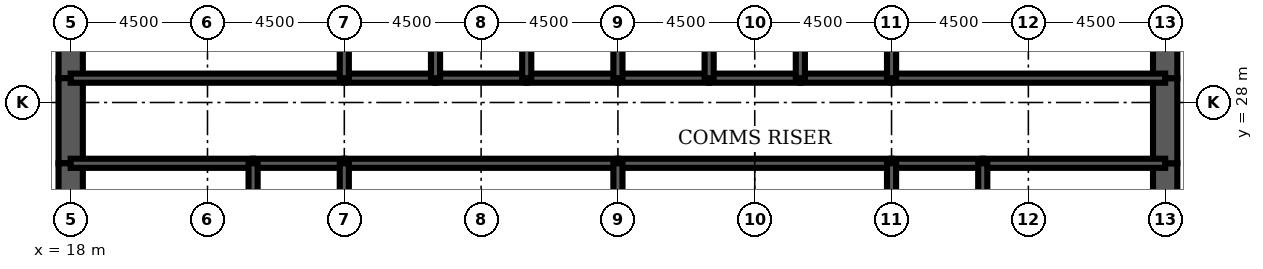
"""IFC4 building model, lengths in metres.
Left out: names, types, materials, properties, quantities, classifications, styles, units other than length and angle.
Written with IfcOpenShell. Run it as: python <this file> out.ifc"""

import sys

from ifc_helpers import new_model, si_unit, direction, frame, frame_2d, origin, place, context, subcontext, project, spatial, rectangle, extrude, element, fill, save


model = new_model("IFC4")
c1 = context("Model", 3, precision=1e-05, world=origin(), true_north=direction((0.0, 1.0)))
c2 = subcontext(c1, "Body", "Model", "MODEL_VIEW")
j1 = project(units=[si_unit("LENGTHUNIT", "METRE"), si_unit("PLANEANGLEUNIT", "RADIAN")], contexts=[c1])
p1 = place(None, origin())
s1 = spatial("IfcSite", under=j1, at=p1, CompositionType="ELEMENT")
p2 = place(p1, origin())
s2 = spatial("IfcBuilding", under=s1, at=p2, CompositionType="ELEMENT")
p3 = place(p2, frame((0.0, 0.0, 190.0)))
s3 = spatial("IfcBuildingStorey", under=s2, at=p3, CompositionType="ELEMENT", Elevation=190.0)
p4 = place(p3, frame((18.0, 32.0, 0.0), z_axis=(0.0, 0.0, 1.0), x_axis=(0.0, -1.0, 0.0)))
e1 = element("IfcWall", 1, at=p4, inside=s3, PredefinedType="SHEAR", context=c2, shape_type="SweptSolid", body=[
    extrude(rectangle(XDim=3.2, YDim=0.8, at=frame_2d((1.6, 0.0))), origin(), (0.0, 0.0, 1.0), 4.2),
])
p5 = place(p3, frame((18.0, 28.8, 0.0), z_axis=(0.0, 0.0, 1.0), x_axis=(0.0, -1.0, 0.0)))
e2 = element("IfcWall", 2, at=p5, inside=s3, PredefinedType="SHEAR", context=c2, shape_type="SweptSolid", body=[
    extrude(rectangle(XDim=2.8, YDim=0.8, at=frame_2d((1.4, 0.0))), origin(), (0.0, 0.0, 1.0), 4.2),
])
p6 = place(p5, frame((0.4, 0.0, 0.0)))
e3 = element("IfcOpeningElement", 3, at=p6, cuts=e2, PredefinedType="OPENING", context=c2, shape_type="SweptSolid", body=[
    extrude(rectangle(XDim=1.8, YDim=2.1, at=frame_2d((0.9, 1.05))), frame((0.0, 0.41, 0.0), z_axis=(0.0, -1.0, 0.0), x_axis=(1.0, 0.0, 0.0)), (0.0, 0.0, 1.0), 0.82),
])
for number, where, z_axis, x_axis in (
    (4, (18.0, 26.0, 0.0), (0.0, 0.0, 1.0), (0.0, -1.0, 0.0)),
    (5, (54.0, 22.0, 0.0), (0.0, 0.0, 1.0), (0.0, 1.0, 0.0)),
):
    element("IfcWall", number, at=place(p3, frame(where, z_axis=z_axis, x_axis=x_axis)), inside=s3, PredefinedType="SHEAR", context=c2, shape_type="SweptSolid", body=[
        extrude(rectangle(XDim=4.0, YDim=0.8, at=frame_2d((2.0, 0.0))), origin(), (0.0, 0.0, 1.0), 4.2),
    ])
p7 = place(p3, frame((54.0, 26.0, 0.0), z_axis=(0.0, 0.0, 1.0), x_axis=(0.0, 1.0, 0.0)))
e6 = element("IfcWall", 6, at=p7, inside=s3, PredefinedType="SHEAR", context=c2, shape_type="SweptSolid", body=[
    extrude(rectangle(XDim=2.8, YDim=0.8, at=frame_2d((1.4, 0.0))), origin(), (0.0, 0.0, 1.0), 4.2),
])
p8 = place(p7, frame((0.6, 0.0, 0.0)))
e7 = element("IfcOpeningElement", 7, at=p8, cuts=e6, PredefinedType="OPENING", context=c2, shape_type="SweptSolid", body=[
    extrude(rectangle(XDim=1.8, YDim=2.1, at=frame_2d((0.9, 1.05))), frame((0.0, 0.41, 0.0), z_axis=(0.0, -1.0, 0.0), x_axis=(1.0, 0.0, 0.0)), (0.0, 0.0, 1.0), 0.82),
])
p9 = place(p3, frame((54.0, 28.8, 0.0), z_axis=(0.0, 0.0, 1.0), x_axis=(0.0, 1.0, 0.0)))
e8 = element("IfcWall", 8, at=p9, inside=s3, PredefinedType="SHEAR", context=c2, shape_type="SweptSolid", body=[
    extrude(rectangle(XDim=3.2, YDim=0.8, at=frame_2d((1.6, 0.0))), origin(), (0.0, 0.0, 1.0), 4.2),
])
p10 = place(p3, frame((18.0, 28.8, 0.0), z_axis=(0.0, 0.0, 1.0), x_axis=(1.0, 0.0, 0.0)))
e9 = element("IfcWall", 9, at=p10, inside=s3, PredefinedType="SOLIDWALL", context=c2, shape_type="SweptSolid", body=[
    extrude(rectangle(XDim=9.0, YDim=0.3, at=frame_2d((4.5, 0.0))), origin(), (0.0, 0.0, 1.0), 4.2),
])
p11 = place(p10, frame((0.65, 0.0, 0.0)))
e10 = element("IfcOpeningElement", 10, at=p11, cuts=e9, PredefinedType="OPENING", context=c2, shape_type="SweptSolid", body=[
    extrude(rectangle(XDim=1.0, YDim=2.1, at=frame_2d((0.5, 1.05))), frame((0.0, 0.16, 0.0), z_axis=(0.0, -1.0, 0.0), x_axis=(1.0, 0.0, 0.0)), (0.0, 0.0, 1.0), 0.32),
])
p12 = place(p3, frame((27.0, 28.8, 0.0), z_axis=(0.0, 0.0, 1.0), x_axis=(1.0, 0.0, 0.0)))
e11 = element("IfcWall", 11, at=p12, inside=s3, PredefinedType="SOLIDWALL", context=c2, shape_type="SweptSolid", body=[
    extrude(rectangle(XDim=3.0, YDim=0.3, at=frame_2d((1.5, 0.0))), origin(), (0.0, 0.0, 1.0), 4.2),
])
p13 = place(p12, frame((0.95, 0.0, 0.0)))
e12 = element("IfcOpeningElement", 12, at=p13, cuts=e11, PredefinedType="OPENING", context=c2, shape_type="SweptSolid", body=[
    extrude(rectangle(XDim=1.1, YDim=2.2, at=frame_2d((0.55, 1.1))), frame((0.0, 0.16, 0.0), z_axis=(0.0, -1.0, 0.0), x_axis=(1.0, 0.0, 0.0)), (0.0, 0.0, 1.0), 0.32),
])
p14 = place(p3, frame((30.0, 28.8, 0.0), z_axis=(0.0, 0.0, 1.0), x_axis=(1.0, 0.0, 0.0)))
e13 = element("IfcWall", 13, at=p14, inside=s3, PredefinedType="SOLIDWALL", context=c2, shape_type="SweptSolid", body=[
    extrude(rectangle(XDim=3.0, YDim=0.3, at=frame_2d((1.5, 0.0))), origin(), (0.0, 0.0, 1.0), 4.2),
])
p15 = place(p14, frame((0.95, 0.0, 0.0)))
e14 = element("IfcOpeningElement", 14, at=p15, cuts=e13, PredefinedType="OPENING", context=c2, shape_type="SweptSolid", body=[
    extrude(rectangle(XDim=1.1, YDim=2.2, at=frame_2d((0.55, 1.1))), frame((0.0, 0.16, 0.0), z_axis=(0.0, -1.0, 0.0), x_axis=(1.0, 0.0, 0.0)), (0.0, 0.0, 1.0), 0.32),
])
p16 = place(p3, frame((33.0, 28.8, 0.0), z_axis=(0.0, 0.0, 1.0), x_axis=(1.0, 0.0, 0.0)))
e15 = element("IfcWall", 15, at=p16, inside=s3, PredefinedType="SOLIDWALL", context=c2, shape_type="SweptSolid", body=[
    extrude(rectangle(XDim=3.0, YDim=0.3, at=frame_2d((1.5, 0.0))), origin(), (0.0, 0.0, 1.0), 4.2),
])
p17 = place(p16, frame((0.95, 0.0, 0.0)))
e16 = element("IfcOpeningElement", 16, at=p17, cuts=e15, PredefinedType="OPENING", context=c2, shape_type="SweptSolid", body=[
    extrude(rectangle(XDim=1.1, YDim=2.2, at=frame_2d((0.55, 1.1))), frame((0.0, 0.16, 0.0), z_axis=(0.0, -1.0, 0.0), x_axis=(1.0, 0.0, 0.0)), (0.0, 0.0, 1.0), 0.32),
])
for number, where, z_axis, x_axis in (
    (17, (36.0, 28.8, 0.0), (0.0, 0.0, 1.0), (1.0, 0.0, 0.0)),
    (18, (39.0, 28.8, 0.0), (0.0, 0.0, 1.0), (1.0, 0.0, 0.0)),
):
    element("IfcWall", number, at=place(p3, frame(where, z_axis=z_axis, x_axis=x_axis)), inside=s3, PredefinedType="SOLIDWALL", context=c2, shape_type="SweptSolid", body=[
        extrude(rectangle(XDim=3.0, YDim=0.3, at=frame_2d((1.5, 0.0))), origin(), (0.0, 0.0, 1.0), 4.2),
    ])
p18 = place(p3, frame((42.0, 28.8, 0.0), z_axis=(0.0, 0.0, 1.0), x_axis=(1.0, 0.0, 0.0)))
e19 = element("IfcWall", 19, at=p18, inside=s3, PredefinedType="SOLIDWALL", context=c2, shape_type="SweptSolid", body=[
    extrude(rectangle(XDim=3.0, YDim=0.3, at=frame_2d((1.5, 0.0))), origin(), (0.0, 0.0, 1.0), 4.2),
])
p19 = place(p18, frame((0.95, 0.0, 0.0)))
e20 = element("IfcOpeningElement", 20, at=p19, cuts=e19, PredefinedType="OPENING", context=c2, shape_type="SweptSolid", body=[
    extrude(rectangle(XDim=1.1, YDim=2.2, at=frame_2d((0.55, 1.1))), frame((0.0, 0.16, 0.0), z_axis=(0.0, -1.0, 0.0), x_axis=(1.0, 0.0, 0.0)), (0.0, 0.0, 1.0), 0.32),
])
p20 = place(p3, frame((45.0, 28.8, 0.0), z_axis=(0.0, 0.0, 1.0), x_axis=(1.0, 0.0, 0.0)))
e21 = element("IfcWall", 21, at=p20, inside=s3, PredefinedType="SOLIDWALL", context=c2, shape_type="SweptSolid", body=[
    extrude(rectangle(XDim=9.0, YDim=0.3, at=frame_2d((4.5, 0.0))), origin(), (0.0, 0.0, 1.0), 4.2),
])
p21 = place(p20, frame((7.35, 0.0, 0.0)))
e22 = element("IfcOpeningElement", 22, at=p21, cuts=e21, PredefinedType="OPENING", context=c2, shape_type="SweptSolid", body=[
    extrude(rectangle(XDim=1.0, YDim=2.1, at=frame_2d((0.5, 1.05))), frame((0.0, 0.16, 0.0), z_axis=(0.0, -1.0, 0.0), x_axis=(1.0, 0.0, 0.0)), (0.0, 0.0, 1.0), 0.32),
])
p22 = place(p3, frame((18.0, 26.0, 0.0), z_axis=(0.0, 0.0, 1.0), x_axis=(1.0, 0.0, 0.0)))
e23 = element("IfcWall", 23, at=p22, inside=s3, PredefinedType="SOLIDWALL", context=c2, shape_type="SweptSolid", body=[
    extrude(rectangle(XDim=6.0, YDim=0.3, at=frame_2d((3.0, 0.0))), origin(), (0.0, 0.0, 1.0), 4.2),
])
p23 = place(p3, frame((24.0, 26.0, 0.0), z_axis=(0.0, 0.0, 1.0), x_axis=(1.0, 0.0, 0.0)))
e24 = element("IfcWall", 24, at=p23, inside=s3, PredefinedType="SOLIDWALL", context=c2, shape_type="SweptSolid", body=[
    extrude(rectangle(XDim=3.0, YDim=0.3, at=frame_2d((1.5, 0.0))), origin(), (0.0, 0.0, 1.0), 4.2),
])
for number, where, z_axis, x_axis in (
    (25, (27.0, 26.0, 0.0), (0.0, 0.0, 1.0), (1.0, 0.0, 0.0)),
    (26, (36.0, 26.0, 0.0), (0.0, 0.0, 1.0), (1.0, 0.0, 0.0)),
):
    element("IfcWall", number, at=place(p3, frame(where, z_axis=z_axis, x_axis=x_axis)), inside=s3, PredefinedType="SOLIDWALL", context=c2, shape_type="SweptSolid", body=[
        extrude(rectangle(XDim=9.0, YDim=0.3, at=frame_2d((4.5, 0.0))), origin(), (0.0, 0.0, 1.0), 4.2),
    ])
p24 = place(p3, frame((45.0, 26.0, 0.0), z_axis=(0.0, 0.0, 1.0), x_axis=(1.0, 0.0, 0.0)))
e27 = element("IfcWall", 27, at=p24, inside=s3, PredefinedType="SOLIDWALL", context=c2, shape_type="SweptSolid", body=[
    extrude(rectangle(XDim=3.0, YDim=0.3, at=frame_2d((1.5, 0.0))), origin(), (0.0, 0.0, 1.0), 4.2),
])
p25 = place(p3, frame((48.0, 26.0, 0.0), z_axis=(0.0, 0.0, 1.0), x_axis=(1.0, 0.0, 0.0)))
e28 = element("IfcWall", 28, at=p25, inside=s3, PredefinedType="SOLIDWALL", context=c2, shape_type="SweptSolid", body=[
    extrude(rectangle(XDim=6.0, YDim=0.3, at=frame_2d((3.0, 0.0))), origin(), (0.0, 0.0, 1.0), 4.2),
])
for number, where, z_axis, x_axis in (
    (29, (27.0, 28.8, 0.0), (0.0, 0.0, 1.0), (0.0, 1.0, 0.0)),
    (30, (30.0, 28.8, 0.0), (0.0, 0.0, 1.0), (0.0, 1.0, 0.0)),
    (31, (33.0, 28.8, 0.0), (0.0, 0.0, 1.0), (0.0, 1.0, 0.0)),
    (32, (36.0, 28.8, 0.0), (0.0, 0.0, 1.0), (0.0, 1.0, 0.0)),
    (33, (39.0, 28.8, 0.0), (0.0, 0.0, 1.0), (0.0, 1.0, 0.0)),
    (34, (42.0, 28.8, 0.0), (0.0, 0.0, 1.0), (0.0, 1.0, 0.0)),
    (35, (45.0, 28.8, 0.0), (0.0, 0.0, 1.0), (0.0, 1.0, 0.0)),
):
    element("IfcWall", number, at=place(p3, frame(where, z_axis=z_axis, x_axis=x_axis)), inside=s3, PredefinedType="SOLIDWALL", context=c2, shape_type="SweptSolid", body=[
        extrude(rectangle(XDim=3.2, YDim=0.3, at=frame_2d((1.6, 0.0))), origin(), (0.0, 0.0, 1.0), 4.2),
    ])
for number, where, z_axis, x_axis in (
    (36, (24.0, 22.0, 0.0), (0.0, 0.0, 1.0), (0.0, 1.0, 0.0)),
    (37, (27.0, 22.0, 0.0), (0.0, 0.0, 1.0), (0.0, 1.0, 0.0)),
    (38, (36.0, 22.0, 0.0), (0.0, 0.0, 1.0), (0.0, 1.0, 0.0)),
    (39, (45.0, 22.0, 0.0), (0.0, 0.0, 1.0), (0.0, 1.0, 0.0)),
    (40, (48.0, 22.0, 0.0), (0.0, 0.0, 1.0), (0.0, 1.0, 0.0)),
):
    element("IfcWall", number, at=place(p3, frame(where, z_axis=z_axis, x_axis=x_axis)), inside=s3, PredefinedType="SOLIDWALL", context=c2, shape_type="SweptSolid", body=[
        extrude(rectangle(XDim=4.0, YDim=0.3, at=frame_2d((2.0, 0.0))), origin(), (0.0, 0.0, 1.0), 4.2),
    ])
p26 = place(p3, frame((39.0, 22.15, 0.0), z_axis=(0.0, 0.0, 1.0), x_axis=(0.0, 1.0, 0.0)))
e41 = element("IfcWall", 41, at=p26, inside=s3, PredefinedType="PARTITIONING", context=c2, shape_type="SweptSolid", body=[
    extrude(rectangle(XDim=3.7, YDim=0.15, at=frame_2d((1.85, 0.0))), origin(), (0.0, 0.0, 1.0), 3.0),
])
p27 = place(p26, frame((2.2, 0.0, 0.0)))
e42 = element("IfcOpeningElement", 42, at=p27, cuts=e41, PredefinedType="OPENING", context=c2, shape_type="SweptSolid", body=[
    extrude(rectangle(XDim=1.0, YDim=2.1, at=frame_2d((0.5, 1.05))), frame((0.0, 0.085, 0.0), z_axis=(0.0, -1.0, 0.0), x_axis=(1.0, 0.0, 0.0)), (0.0, 0.0, 1.0), 0.17),
])
for number, where, z_axis, x_axis in (
    (43, (20.275, 22.15, 0.0), (0.0, 0.0, 1.0), (0.0, 1.0, 0.0)),
    (44, (51.725, 22.15, 0.0), (0.0, 0.0, 1.0), (0.0, 1.0, 0.0)),
):
    element("IfcWall", number, at=place(p3, frame(where, z_axis=z_axis, x_axis=x_axis)), inside=s3, PredefinedType="PARTITIONING", context=c2, shape_type="SweptSolid", body=[
        extrude(rectangle(XDim=3.7, YDim=0.15, at=frame_2d((1.85, 0.0))), origin(), (0.0, 0.0, 1.0), 3.0),
    ])
p28 = place(p27, origin())
e45 = element("IfcDoor", 45, at=p28, inside=s3, OperationType="SINGLE_SWING_RIGHT", PredefinedType="DOOR", context=c2, shape_type="SweptSolid", body=[
    extrude(rectangle(XDim=1.0, YDim=2.1, at=frame_2d((0.5, 1.05))), frame((0.0, 0.025, 0.0), z_axis=(0.0, -1.0, 0.0), x_axis=(1.0, 0.0, 0.0)), (0.0, 0.0, 1.0), 0.05),
])
fill(e42, e45)
p29 = place(p19, origin())
e46 = element("IfcDoor", 46, at=p29, inside=s3, OperationType="DOUBLE_DOOR_SLIDING", PredefinedType="USERDEFINED", context=c2, shape_type="SweptSolid", body=[
    extrude(rectangle(XDim=1.1, YDim=2.2, at=frame_2d((0.55, 1.1))), frame((0.0, 0.025, 0.0), z_axis=(0.0, -1.0, 0.0), x_axis=(1.0, 0.0, 0.0)), (0.0, 0.0, 1.0), 0.05),
])
fill(e20, e46)
p30 = place(p13, origin())
e47 = element("IfcDoor", 47, at=p30, inside=s3, OperationType="DOUBLE_DOOR_SLIDING", PredefinedType="USERDEFINED", context=c2, shape_type="SweptSolid", body=[
    extrude(rectangle(XDim=1.1, YDim=2.2, at=frame_2d((0.55, 1.1))), frame((0.0, 0.025, 0.0), z_axis=(0.0, -1.0, 0.0), x_axis=(1.0, 0.0, 0.0)), (0.0, 0.0, 1.0), 0.05),
])
fill(e12, e47)
p31 = place(p15, origin())
e48 = element("IfcDoor", 48, at=p31, inside=s3, OperationType="DOUBLE_DOOR_SLIDING", PredefinedType="USERDEFINED", context=c2, shape_type="SweptSolid", body=[
    extrude(rectangle(XDim=1.1, YDim=2.2, at=frame_2d((0.55, 1.1))), frame((0.0, 0.025, 0.0), z_axis=(0.0, -1.0, 0.0), x_axis=(1.0, 0.0, 0.0)), (0.0, 0.0, 1.0), 0.05),
])
fill(e14, e48)
p32 = place(p17, origin())
e49 = element("IfcDoor", 49, at=p32, inside=s3, OperationType="DOUBLE_DOOR_SLIDING", PredefinedType="USERDEFINED", context=c2, shape_type="SweptSolid", body=[
    extrude(rectangle(XDim=1.1, YDim=2.2, at=frame_2d((0.55, 1.1))), frame((0.0, 0.025, 0.0), z_axis=(0.0, -1.0, 0.0), x_axis=(1.0, 0.0, 0.0)), (0.0, 0.0, 1.0), 0.05),
])
fill(e16, e49)
p33 = place(p11, origin())
e50 = element("IfcDoor", 50, at=p33, inside=s3, OperationType="SINGLE_SWING_LEFT", PredefinedType="DOOR", context=c2, shape_type="SweptSolid", body=[
    extrude(rectangle(XDim=1.0, YDim=2.1, at=frame_2d((0.5, 1.05))), frame((0.0, 0.025, 0.0), z_axis=(0.0, -1.0, 0.0), x_axis=(1.0, 0.0, 0.0)), (0.0, 0.0, 1.0), 0.05),
])
fill(e10, e50)
p34 = place(p21, origin())
e51 = element("IfcDoor", 51, at=p34, inside=s3, OperationType="SINGLE_SWING_RIGHT", PredefinedType="DOOR", context=c2, shape_type="SweptSolid", body=[
    extrude(rectangle(XDim=1.0, YDim=2.1, at=frame_2d((0.5, 1.05))), frame((0.0, 0.025, 0.0), z_axis=(0.0, -1.0, 0.0), x_axis=(1.0, 0.0, 0.0)), (0.0, 0.0, 1.0), 0.05),
])
fill(e22, e51)
p35 = place(p6, origin())
e52 = element("IfcDoor", 52, at=p35, inside=s3, OperationType="SINGLE_SWING_LEFT", PredefinedType="DOOR", context=c2, shape_type="SweptSolid", body=[
    extrude(rectangle(XDim=1.8, YDim=2.1, at=frame_2d((0.9, 1.05))), frame((0.0, 0.4, 0.0), z_axis=(0.0, -1.0, 0.0), x_axis=(1.0, 0.0, 0.0)), (0.0, 0.0, 1.0), 0.8),
])
fill(e3, e52)
p36 = place(p8, origin())
e53 = element("IfcDoor", 53, at=p36, inside=s3, OperationType="SINGLE_SWING_LEFT", PredefinedType="DOOR", context=c2, shape_type="SweptSolid", body=[
    extrude(rectangle(XDim=1.8, YDim=2.1, at=frame_2d((0.9, 1.05))), frame((0.0, 0.4, 0.0), z_axis=(0.0, -1.0, 0.0), x_axis=(1.0, 0.0, 0.0)), (0.0, 0.0, 1.0), 0.8),
])
fill(e7, e53)
save(model, sys.argv[1])
